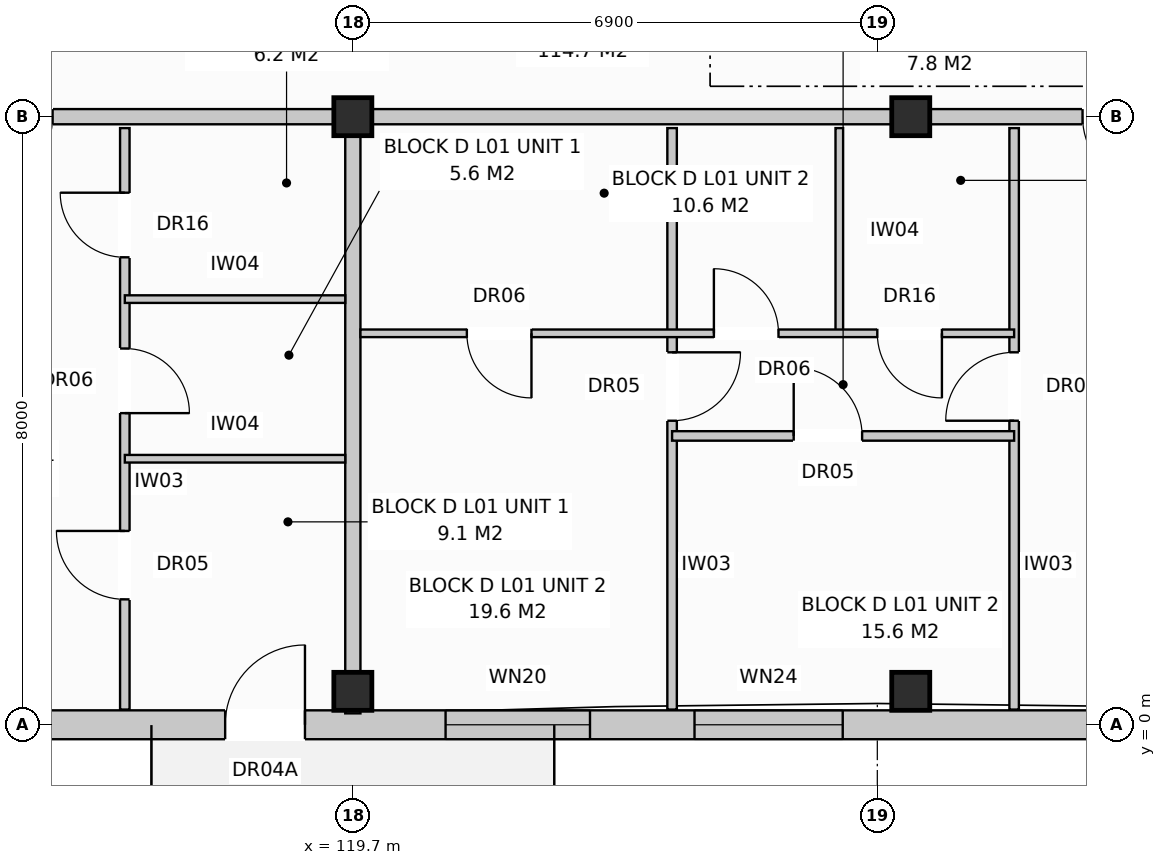
"""IFC4 building model, lengths in metres.
Left out: names, types, materials, properties, quantities, classifications, styles, units other than length and angle.
Written with IfcOpenShell. Run it as: python <this file> out.ifc"""

import sys

from ifc_helpers import new_model, si_unit, direction, frame, frame_2d, origin, origin_with_axes, origin_2d, place, context, subcontext, project, spatial, rectangle, extrude, element, fill, save


model = new_model("IFC4")
c1 = context("Model", 3, precision=1e-05, world=origin(), true_north=direction((0.0, 1.0)))
c2 = subcontext(c1, "Body", "Model", "MODEL_VIEW")
j1 = project(units=[si_unit("LENGTHUNIT", "METRE"), si_unit("PLANEANGLEUNIT", "RADIAN")], contexts=[c1])
p1 = place(None, origin())
s1 = spatial("IfcSite", under=j1, at=p1, CompositionType="ELEMENT")
p2 = place(p1, origin())
s2 = spatial("IfcBuilding", under=s1, at=p2, CompositionType="ELEMENT")
p3 = place(p2, frame((0.0, 0.0, 4.4)))
s3 = spatial("IfcBuildingStorey", under=s2, at=p3, CompositionType="ELEMENT", Elevation=4.4)
for number, where, z_axis, x_axis in (
    (1, (119.7, 0.44, 0.0), (0.0, 0.0, 1.0), (1.0, 0.0, 0.0)),
    (2, (119.7, 8.0, 0.0), (0.0, 0.0, 1.0), (1.0, 0.0, 0.0)),
    (3, (127.04, 0.44, 0.0), (0.0, 0.0, 1.0), (1.0, 0.0, 0.0)),
    (4, (127.04, 8.0, 0.0), (0.0, 0.0, 1.0), (1.0, 0.0, 0.0)),
):
    element("IfcColumn", number, at=place(p3, frame(where, z_axis=z_axis, x_axis=x_axis)), inside=s3, PredefinedType="COLUMN", context=c2, shape_type="SweptSolid", body=[
        extrude(rectangle(XDim=0.5, YDim=0.5, at=origin_2d()), origin(), (0.0, 0.0, 1.0), 3.6),
    ])
p4 = place(p3, frame((112.98, 0.0, 0.0), z_axis=(0.0, 0.0, 1.0), x_axis=(1.0, 0.0, 0.0)))
e5 = element("IfcWall", 5, at=p4, inside=s3, PredefinedType="STANDARD", context=c2, shape_type="SweptSolid", body=[
    extrude(rectangle(XDim=54.84, YDim=0.38, at=frame_2d((27.42, 0.0))), origin(), (0.0, 0.0, 1.0), 3.33),
])
p5 = place(p4, frame((5.04, 0.0, 0.0)))
e6 = element("IfcOpeningElement", 6, at=p5, cuts=e5, PredefinedType="OPENING", context=c2, shape_type="SweptSolid", body=[
    extrude(rectangle(XDim=1.05, YDim=2.12, at=frame_2d((0.525, 1.06))), frame((0.0, 0.202, 0.0), z_axis=(0.0, -1.0, 0.0), x_axis=(1.0, 0.0, 0.0)), (0.0, 0.0, 1.0), 0.404),
])
p6 = place(p4, frame((18.857, 0.0, 0.0)))
e7 = element("IfcOpeningElement", 7, at=p6, cuts=e5, PredefinedType="OPENING", context=c2, shape_type="SweptSolid", body=[
    extrude(rectangle(XDim=1.05, YDim=2.12, at=frame_2d((0.525, 1.06))), frame((0.0, 0.202, 0.0), z_axis=(0.0, -1.0, 0.0), x_axis=(1.0, 0.0, 0.0)), (0.0, 0.0, 1.0), 0.404),
])
p7 = place(p4, frame((32.657, 0.0, 0.0)))
e8 = element("IfcOpeningElement", 8, at=p7, cuts=e5, PredefinedType="OPENING", context=c2, shape_type="SweptSolid", body=[
    extrude(rectangle(XDim=1.05, YDim=2.12, at=frame_2d((0.525, 1.06))), frame((0.0, 0.202, 0.0), z_axis=(0.0, -1.0, 0.0), x_axis=(1.0, 0.0, 0.0)), (0.0, 0.0, 1.0), 0.404),
])
p8 = place(p4, frame((48.74, 0.0, 0.0)))
e9 = element("IfcOpeningElement", 9, at=p8, cuts=e5, PredefinedType="OPENING", context=c2, shape_type="SweptSolid", body=[
    extrude(rectangle(XDim=1.05, YDim=2.12, at=frame_2d((0.525, 1.06))), frame((0.0, 0.202, 0.0), z_axis=(0.0, -1.0, 0.0), x_axis=(1.0, 0.0, 0.0)), (0.0, 0.0, 1.0), 0.404),
])
p9 = place(p4, frame((0.89, 0.0, 0.8)))
e10 = element("IfcOpeningElement", 10, at=p9, cuts=e5, PredefinedType="OPENING", context=c2, shape_type="SweptSolid", body=[
    extrude(rectangle(XDim=1.8, YDim=1.7, at=frame_2d((0.9, 0.85))), frame((0.0, 0.202, 0.0), z_axis=(0.0, -1.0, 0.0), x_axis=(1.0, 0.0, 0.0)), (0.0, 0.0, 1.0), 0.404),
])
p10 = place(p4, frame((7.94, 0.0, 0.8)))
e11 = element("IfcOpeningElement", 11, at=p10, cuts=e5, PredefinedType="OPENING", context=c2, shape_type="SweptSolid", body=[
    extrude(rectangle(XDim=1.9, YDim=1.85, at=frame_2d((0.95, 0.925))), frame((0.0, 0.202, 0.0), z_axis=(0.0, -1.0, 0.0), x_axis=(1.0, 0.0, 0.0)), (0.0, 0.0, 1.0), 0.404),
])
p11 = place(p4, frame((11.215, 0.0, 0.8)))
e12 = element("IfcOpeningElement", 12, at=p11, cuts=e5, PredefinedType="OPENING", context=c2, shape_type="SweptSolid", body=[
    extrude(rectangle(XDim=1.95, YDim=1.65, at=frame_2d((0.975, 0.825))), frame((0.0, 0.202, 0.0), z_axis=(0.0, -1.0, 0.0), x_axis=(1.0, 0.0, 0.0)), (0.0, 0.0, 1.0), 0.404),
])
p12 = place(p4, frame((16.79, 0.0, 0.8)))
e13 = element("IfcOpeningElement", 13, at=p12, cuts=e5, PredefinedType="OPENING", context=c2, shape_type="SweptSolid", body=[
    extrude(rectangle(XDim=1.8, YDim=1.7, at=frame_2d((0.9, 0.85))), frame((0.0, 0.202, 0.0), z_axis=(0.0, -1.0, 0.0), x_axis=(1.0, 0.0, 0.0)), (0.0, 0.0, 1.0), 0.404),
])
p13 = place(p4, frame((22.24, 0.0, 0.8)))
e14 = element("IfcOpeningElement", 14, at=p13, cuts=e5, PredefinedType="OPENING", context=c2, shape_type="SweptSolid", body=[
    extrude(rectangle(XDim=1.9, YDim=1.85, at=frame_2d((0.95, 0.925))), frame((0.0, 0.202, 0.0), z_axis=(0.0, -1.0, 0.0), x_axis=(1.0, 0.0, 0.0)), (0.0, 0.0, 1.0), 0.404),
])
p14 = place(p4, frame((27.873, 0.0, 0.8)))
e15 = element("IfcOpeningElement", 15, at=p14, cuts=e5, PredefinedType="OPENING", context=c2, shape_type="SweptSolid", body=[
    extrude(rectangle(XDim=1.95, YDim=1.65, at=frame_2d((0.975, 0.825))), frame((0.0, 0.202, 0.0), z_axis=(0.0, -1.0, 0.0), x_axis=(1.0, 0.0, 0.0)), (0.0, 0.0, 1.0), 0.404),
])
p15 = place(p4, frame((30.59, 0.0, 0.8)))
e16 = element("IfcOpeningElement", 16, at=p15, cuts=e5, PredefinedType="OPENING", context=c2, shape_type="SweptSolid", body=[
    extrude(rectangle(XDim=1.8, YDim=1.7, at=frame_2d((0.9, 0.85))), frame((0.0, 0.202, 0.0), z_axis=(0.0, -1.0, 0.0), x_axis=(1.0, 0.0, 0.0)), (0.0, 0.0, 1.0), 0.404),
])
p16 = place(p4, frame((36.54, 0.0, 0.8)))
e17 = element("IfcOpeningElement", 17, at=p16, cuts=e5, PredefinedType="OPENING", context=c2, shape_type="SweptSolid", body=[
    extrude(rectangle(XDim=1.9, YDim=1.85, at=frame_2d((0.95, 0.925))), frame((0.0, 0.202, 0.0), z_axis=(0.0, -1.0, 0.0), x_axis=(1.0, 0.0, 0.0)), (0.0, 0.0, 1.0), 0.404),
])
p17 = place(p4, frame((42.215, 0.0, 0.8)))
e18 = element("IfcOpeningElement", 18, at=p17, cuts=e5, PredefinedType="OPENING", context=c2, shape_type="SweptSolid", body=[
    extrude(rectangle(XDim=1.95, YDim=1.65, at=frame_2d((0.975, 0.825))), frame((0.0, 0.202, 0.0), z_axis=(0.0, -1.0, 0.0), x_axis=(1.0, 0.0, 0.0)), (0.0, 0.0, 1.0), 0.404),
])
p18 = place(p4, frame((46.04, 0.0, 0.85)))
e19 = element("IfcOpeningElement", 19, at=p18, cuts=e5, PredefinedType="OPENING", context=c2, shape_type="SweptSolid", body=[
    extrude(rectangle(XDim=1.6, YDim=1.85, at=frame_2d((0.8, 0.925))), frame((0.0, 0.202, 0.0), z_axis=(0.0, -1.0, 0.0), x_axis=(1.0, 0.0, 0.0)), (0.0, 0.0, 1.0), 0.404),
])
p19 = place(p4, frame((52.04, 0.0, 0.8)))
e20 = element("IfcOpeningElement", 20, at=p19, cuts=e5, PredefinedType="OPENING", context=c2, shape_type="SweptSolid", body=[
    extrude(rectangle(XDim=1.9, YDim=1.85, at=frame_2d((0.95, 0.925))), frame((0.0, 0.202, 0.0), z_axis=(0.0, -1.0, 0.0), x_axis=(1.0, 0.0, 0.0)), (0.0, 0.0, 1.0), 0.404),
])
p20 = place(p3, frame((119.7, 7.85, 0.0), z_axis=(0.0, 0.0, 1.0), x_axis=(0.0, -1.0, 0.0)))
e21 = element("IfcWall", 21, at=p20, inside=s3, PredefinedType="PARTITIONING", context=c2, shape_type="SweptSolid", body=[
    extrude(rectangle(XDim=7.7, YDim=0.2, at=frame_2d((3.85, 0.0))), origin(), (0.0, 0.0, 1.0), 2.77),
])
p21 = place(p3, frame((112.8, 8.0, 0.0), z_axis=(0.0, 0.0, 1.0), x_axis=(1.0, 0.0, 0.0)))
e22 = element("IfcWall", 22, at=p21, inside=s3, PredefinedType="PARTITIONING", context=c2, shape_type="SweptSolid", body=[
    extrude(rectangle(XDim=6.9, YDim=0.2, at=frame_2d((3.45, 0.0))), origin(), (0.0, 0.0, 1.0), 2.77),
])
p22 = place(p21, frame((2.0, 0.0, 0.0)))
e23 = element("IfcOpeningElement", 23, at=p22, cuts=e22, PredefinedType="OPENING", context=c2, shape_type="SweptSolid", body=[
    extrude(rectangle(XDim=0.95, YDim=2.15, at=frame_2d((0.475, 1.075))), frame((0.0, 0.112, 0.0), z_axis=(0.0, -1.0, 0.0), x_axis=(1.0, 0.0, 0.0)), (0.0, 0.0, 1.0), 0.224),
])
p23 = place(p3, frame((116.7, 7.85, 0.0), z_axis=(0.0, 0.0, 1.0), x_axis=(0.0, -1.0, 0.0)))
e24 = element("IfcWall", 24, at=p23, inside=s3, PredefinedType="PARTITIONING", context=c2, shape_type="SweptSolid", body=[
    extrude(rectangle(XDim=7.65, YDim=0.125, at=frame_2d((3.825, 0.0))), origin(), (0.0, 0.0, 1.0), 3.33),
])
p24 = place(p23, frame((0.85, 0.0, 0.0)))
e25 = element("IfcOpeningElement", 25, at=p24, cuts=e24, PredefinedType="OPENING", context=c2, shape_type="SweptSolid", body=[
    extrude(rectangle(XDim=0.85, YDim=2.1, at=frame_2d((0.425, 1.05))), frame((0.0, 0.074, 0.0), z_axis=(0.0, -1.0, 0.0), x_axis=(1.0, 0.0, 0.0)), (0.0, 0.0, 1.0), 0.149),
])
p25 = place(p23, frame((2.9, 0.0, 0.0)))
e26 = element("IfcOpeningElement", 26, at=p25, cuts=e24, PredefinedType="OPENING", context=c2, shape_type="SweptSolid", body=[
    extrude(rectangle(XDim=0.85, YDim=2.05, at=frame_2d((0.425, 1.025))), frame((0.0, 0.074, 0.0), z_axis=(0.0, -1.0, 0.0), x_axis=(1.0, 0.0, 0.0)), (0.0, 0.0, 1.0), 0.149),
])
p26 = place(p23, frame((5.3, 0.0, 0.0)))
e27 = element("IfcOpeningElement", 27, at=p26, cuts=e24, PredefinedType="OPENING", context=c2, shape_type="SweptSolid", body=[
    extrude(rectangle(XDim=0.9, YDim=2.1, at=frame_2d((0.45, 1.05))), frame((0.0, 0.074, 0.0), z_axis=(0.0, -1.0, 0.0), x_axis=(1.0, 0.0, 0.0)), (0.0, 0.0, 1.0), 0.149),
])
for number, where, z_axis, x_axis in (
    (28, (116.7, 5.6, 0.0), (0.0, 0.0, 1.0), (1.0, 0.0, 0.0)),
    (29, (116.7, 3.5, 0.0), (0.0, 0.0, 1.0), (1.0, 0.0, 0.0)),
):
    element("IfcWall", number, at=place(p3, frame(where, z_axis=z_axis, x_axis=x_axis)), inside=s3, PredefinedType="PARTITIONING", context=c2, shape_type="SweptSolid", body=[
        extrude(rectangle(XDim=2.9, YDim=0.1, at=frame_2d((1.45, 0.0))), origin(), (0.0, 0.0, 1.0), 3.33),
    ])
p27 = place(p3, frame((119.7, 8.0, 0.0), z_axis=(0.0, 0.0, 1.0), x_axis=(1.0, 0.0, 0.0)))
e30 = element("IfcWall", 30, at=p27, inside=s3, PredefinedType="PARTITIONING", context=c2, shape_type="SweptSolid", body=[
    extrude(rectangle(XDim=13.8, YDim=0.2, at=frame_2d((6.9, 0.0))), origin(), (0.0, 0.0, 1.0), 2.77),
])
p28 = place(p27, frame((9.6, 0.0, 0.0)))
e31 = element("IfcOpeningElement", 31, at=p28, cuts=e30, PredefinedType="OPENING", context=c2, shape_type="SweptSolid", body=[
    extrude(rectangle(XDim=0.95, YDim=2.15, at=frame_2d((0.475, 1.075))), frame((0.0, 0.112, 0.0), z_axis=(0.0, -1.0, 0.0), x_axis=(1.0, 0.0, 0.0)), (0.0, 0.0, 1.0), 0.224),
])
p29 = place(p3, frame((128.4, 7.85, 0.0), z_axis=(0.0, 0.0, 1.0), x_axis=(0.0, -1.0, 0.0)))
e32 = element("IfcWall", 32, at=p29, inside=s3, PredefinedType="PARTITIONING", context=c2, shape_type="SweptSolid", body=[
    extrude(rectangle(XDim=7.65, YDim=0.125, at=frame_2d((3.825, 0.0))), origin(), (0.0, 0.0, 1.0), 3.33),
])
p30 = place(p29, frame((2.95, 0.0, 0.0)))
e33 = element("IfcOpeningElement", 33, at=p30, cuts=e32, PredefinedType="OPENING", context=c2, shape_type="SweptSolid", body=[
    extrude(rectangle(XDim=0.9, YDim=2.1, at=frame_2d((0.45, 1.05))), frame((0.0, 0.074, 0.0), z_axis=(0.0, -1.0, 0.0), x_axis=(1.0, 0.0, 0.0)), (0.0, 0.0, 1.0), 0.149),
])
p31 = place(p3, frame((123.9, 7.85, 0.0), z_axis=(0.0, 0.0, 1.0), x_axis=(0.0, -1.0, 0.0)))
e34 = element("IfcWall", 34, at=p31, inside=s3, PredefinedType="PARTITIONING", context=c2, shape_type="SweptSolid", body=[
    extrude(rectangle(XDim=7.65, YDim=0.125, at=frame_2d((3.825, 0.0))), origin(), (0.0, 0.0, 1.0), 2.99),
])
p32 = place(p31, frame((2.95, 0.0, 0.0)))
e35 = element("IfcOpeningElement", 35, at=p32, cuts=e34, PredefinedType="OPENING", context=c2, shape_type="SweptSolid", body=[
    extrude(rectangle(XDim=0.9, YDim=2.1, at=frame_2d((0.45, 1.05))), frame((0.0, 0.074, 0.0), z_axis=(0.0, -1.0, 0.0), x_axis=(1.0, 0.0, 0.0)), (0.0, 0.0, 1.0), 0.149),
])
p33 = place(p3, frame((126.1, 7.85, 0.0), z_axis=(0.0, 0.0, 1.0), x_axis=(0.0, -1.0, 0.0)))
e36 = element("IfcWall", 36, at=p33, inside=s3, PredefinedType="PARTITIONING", context=c2, shape_type="SweptSolid", body=[
    extrude(rectangle(XDim=2.7, YDim=0.1, at=frame_2d((1.35, 0.0))), origin(), (0.0, 0.0, 1.0), 3.33),
])
p34 = place(p3, frame((119.8, 5.15, 0.0), z_axis=(0.0, 0.0, 1.0), x_axis=(1.0, 0.0, 0.0)))
e37 = element("IfcWall", 37, at=p34, inside=s3, PredefinedType="PARTITIONING", context=c2, shape_type="SweptSolid", body=[
    extrude(rectangle(XDim=8.6, YDim=0.1, at=frame_2d((4.3, 0.0))), origin(), (0.0, 0.0, 1.0), 3.33),
])
p35 = place(p34, frame((1.4, 0.0, 0.0)))
e38 = element("IfcOpeningElement", 38, at=p35, cuts=e37, PredefinedType="OPENING", context=c2, shape_type="SweptSolid", body=[
    extrude(rectangle(XDim=0.85, YDim=2.05, at=frame_2d((0.425, 1.025))), frame((0.0, 0.062, 0.0), z_axis=(0.0, -1.0, 0.0), x_axis=(1.0, 0.0, 0.0)), (0.0, 0.0, 1.0), 0.124),
])
p36 = place(p34, frame((4.65, 0.0, 0.0)))
e39 = element("IfcOpeningElement", 39, at=p36, cuts=e37, PredefinedType="OPENING", context=c2, shape_type="SweptSolid", body=[
    extrude(rectangle(XDim=0.85, YDim=2.05, at=frame_2d((0.425, 1.025))), frame((0.0, 0.062, 0.0), z_axis=(0.0, -1.0, 0.0), x_axis=(1.0, 0.0, 0.0)), (0.0, 0.0, 1.0), 0.124),
])
p37 = place(p34, frame((6.8, 0.0, 0.0)))
e40 = element("IfcOpeningElement", 40, at=p37, cuts=e37, PredefinedType="OPENING", context=c2, shape_type="SweptSolid", body=[
    extrude(rectangle(XDim=0.85, YDim=2.1, at=frame_2d((0.425, 1.05))), frame((0.0, 0.062, 0.0), z_axis=(0.0, -1.0, 0.0), x_axis=(1.0, 0.0, 0.0)), (0.0, 0.0, 1.0), 0.124),
])
p38 = place(p3, frame((123.9, 3.8, 0.0), z_axis=(0.0, 0.0, 1.0), x_axis=(1.0, 0.0, 0.0)))
e41 = element("IfcWall", 41, at=p38, inside=s3, PredefinedType="PARTITIONING", context=c2, shape_type="SweptSolid", body=[
    extrude(rectangle(XDim=4.5, YDim=0.125, at=frame_2d((2.25, 0.0))), origin(), (0.0, 0.0, 1.0), 3.33),
])
p39 = place(p38, frame((1.6, 0.0, 0.0)))
e42 = element("IfcOpeningElement", 42, at=p39, cuts=e41, PredefinedType="OPENING", context=c2, shape_type="SweptSolid", body=[
    extrude(rectangle(XDim=0.9, YDim=2.1, at=frame_2d((0.45, 1.05))), frame((0.0, 0.074, 0.0), z_axis=(0.0, -1.0, 0.0), x_axis=(1.0, 0.0, 0.0)), (0.0, 0.0, 1.0), 0.149),
])
p40 = place(p5, origin_with_axes())
e43 = element("IfcDoor", 43, at=p40, inside=s3, OperationType="SINGLE_SWING_RIGHT", PredefinedType="DOOR", context=c2, shape_type="SweptSolid", body=[
    extrude(rectangle(XDim=1.05, YDim=2.12, at=frame_2d((0.525, 1.06))), frame((0.0, 0.025, 0.0), z_axis=(0.0, -1.0, 0.0), x_axis=(1.0, 0.0, 0.0)), (0.0, 0.0, 1.0), 0.05),
])
fill(e6, e43)
p41 = place(p10, origin_with_axes())
e44 = element("IfcWindow", 44, at=p41, inside=s3, PartitioningType="SINGLE_PANEL", PredefinedType="WINDOW", context=c2, shape_type="SweptSolid", body=[
    extrude(rectangle(XDim=1.9, YDim=1.85, at=frame_2d((0.95, 0.925))), frame((0.0, 0.03, 0.0), z_axis=(0.0, -1.0, 0.0), x_axis=(1.0, 0.0, 0.0)), (0.0, 0.0, 1.0), 0.06),
])
fill(e11, e44)
p42 = place(p11, origin_with_axes())
e45 = element("IfcWindow", 45, at=p42, inside=s3, PartitioningType="SINGLE_PANEL", PredefinedType="WINDOW", context=c2, shape_type="SweptSolid", body=[
    extrude(rectangle(XDim=1.95, YDim=1.65, at=frame_2d((0.975, 0.825))), frame((0.0, 0.03, 0.0), z_axis=(0.0, -1.0, 0.0), x_axis=(1.0, 0.0, 0.0)), (0.0, 0.0, 1.0), 0.06),
])
fill(e12, e45)
p43 = place(p24, frame((0.85, 0.0, 0.0), z_axis=(0.0, 0.0, 1.0), x_axis=(-1.0, 0.0, 0.0)))
e46 = element("IfcDoor", 46, at=p43, inside=s3, OperationType="SINGLE_SWING_LEFT", PredefinedType="DOOR", context=c2, shape_type="SweptSolid", body=[
    extrude(rectangle(XDim=0.85, YDim=2.1, at=frame_2d((0.425, 1.05))), frame((0.0, 0.025, 0.0), z_axis=(0.0, -1.0, 0.0), x_axis=(1.0, 0.0, 0.0)), (0.0, 0.0, 1.0), 0.05),
])
fill(e25, e46)
p44 = place(p25, origin_with_axes())
e47 = element("IfcDoor", 47, at=p44, inside=s3, OperationType="SINGLE_SWING_RIGHT", PredefinedType="DOOR", context=c2, shape_type="SweptSolid", body=[
    extrude(rectangle(XDim=0.85, YDim=2.05, at=frame_2d((0.425, 1.025))), frame((0.0, 0.025, 0.0), z_axis=(0.0, -1.0, 0.0), x_axis=(1.0, 0.0, 0.0)), (0.0, 0.0, 1.0), 0.05),
])
fill(e26, e47)
p45 = place(p26, frame((0.9, 0.0, 0.0), z_axis=(0.0, 0.0, 1.0), x_axis=(-1.0, 0.0, 0.0)))
e48 = element("IfcDoor", 48, at=p45, inside=s3, OperationType="SINGLE_SWING_LEFT", PredefinedType="DOOR", context=c2, shape_type="SweptSolid", body=[
    extrude(rectangle(XDim=0.9, YDim=2.1, at=frame_2d((0.45, 1.05))), frame((0.0, 0.025, 0.0), z_axis=(0.0, -1.0, 0.0), x_axis=(1.0, 0.0, 0.0)), (0.0, 0.0, 1.0), 0.05),
])
fill(e27, e48)
p46 = place(p28, frame((0.95, 0.0, 0.0), z_axis=(0.0, 0.0, 1.0), x_axis=(-1.0, 0.0, 0.0)))
e49 = element("IfcDoor", 49, at=p46, inside=s3, OperationType="SINGLE_SWING_RIGHT", PredefinedType="DOOR", context=c2, shape_type="SweptSolid", body=[
    extrude(rectangle(XDim=0.95, YDim=2.15, at=frame_2d((0.475, 1.075))), frame((0.0, 0.025, 0.0), z_axis=(0.0, -1.0, 0.0), x_axis=(1.0, 0.0, 0.0)), (0.0, 0.0, 1.0), 0.05),
])
fill(e31, e49)
p47 = place(p30, frame((0.9, 0.0, 0.0), z_axis=(0.0, 0.0, 1.0), x_axis=(-1.0, 0.0, 0.0)))
e50 = element("IfcDoor", 50, at=p47, inside=s3, OperationType="SINGLE_SWING_RIGHT", PredefinedType="DOOR", context=c2, shape_type="SweptSolid", body=[
    extrude(rectangle(XDim=0.9, YDim=2.1, at=frame_2d((0.45, 1.05))), frame((0.0, 0.025, 0.0), z_axis=(0.0, -1.0, 0.0), x_axis=(1.0, 0.0, 0.0)), (0.0, 0.0, 1.0), 0.05),
])
fill(e33, e50)
p48 = place(p32, origin_with_axes())
e51 = element("IfcDoor", 51, at=p48, inside=s3, OperationType="SINGLE_SWING_LEFT", PredefinedType="DOOR", context=c2, shape_type="SweptSolid", body=[
    extrude(rectangle(XDim=0.9, YDim=2.1, at=frame_2d((0.45, 1.05))), frame((0.0, 0.025, 0.0), z_axis=(0.0, -1.0, 0.0), x_axis=(1.0, 0.0, 0.0)), (0.0, 0.0, 1.0), 0.05),
])
fill(e35, e51)
p49 = place(p35, frame((0.85, 0.0, 0.0), z_axis=(0.0, 0.0, 1.0), x_axis=(-1.0, 0.0, 0.0)))
e52 = element("IfcDoor", 52, at=p49, inside=s3, OperationType="SINGLE_SWING_RIGHT", PredefinedType="DOOR", context=c2, shape_type="SweptSolid", body=[
    extrude(rectangle(XDim=0.85, YDim=2.05, at=frame_2d((0.425, 1.025))), frame((0.0, 0.025, 0.0), z_axis=(0.0, -1.0, 0.0), x_axis=(1.0, 0.0, 0.0)), (0.0, 0.0, 1.0), 0.05),
])
fill(e38, e52)
p50 = place(p36, origin_with_axes())
e53 = element("IfcDoor", 53, at=p50, inside=s3, OperationType="SINGLE_SWING_LEFT", PredefinedType="DOOR", context=c2, shape_type="SweptSolid", body=[
    extrude(rectangle(XDim=0.85, YDim=2.05, at=frame_2d((0.425, 1.025))), frame((0.0, 0.025, 0.0), z_axis=(0.0, -1.0, 0.0), x_axis=(1.0, 0.0, 0.0)), (0.0, 0.0, 1.0), 0.05),
])
fill(e39, e53)
p51 = place(p37, frame((0.85, 0.0, 0.0), z_axis=(0.0, 0.0, 1.0), x_axis=(-1.0, 0.0, 0.0)))
e54 = element("IfcDoor", 54, at=p51, inside=s3, OperationType="SINGLE_SWING_RIGHT", PredefinedType="DOOR", context=c2, shape_type="SweptSolid", body=[
    extrude(rectangle(XDim=0.85, YDim=2.1, at=frame_2d((0.425, 1.05))), frame((0.0, 0.025, 0.0), z_axis=(0.0, -1.0, 0.0), x_axis=(1.0, 0.0, 0.0)), (0.0, 0.0, 1.0), 0.05),
])
fill(e40, e54)
p52 = place(p39, origin_with_axes())
e55 = element("IfcDoor", 55, at=p52, inside=s3, OperationType="SINGLE_SWING_LEFT", PredefinedType="DOOR", context=c2, shape_type="SweptSolid", body=[
    extrude(rectangle(XDim=0.9, YDim=2.1, at=frame_2d((0.45, 1.05))), frame((0.0, 0.025, 0.0), z_axis=(0.0, -1.0, 0.0), x_axis=(1.0, 0.0, 0.0)), (0.0, 0.0, 1.0), 0.05),
])
fill(e42, e55)
save(model, sys.argv[1])
